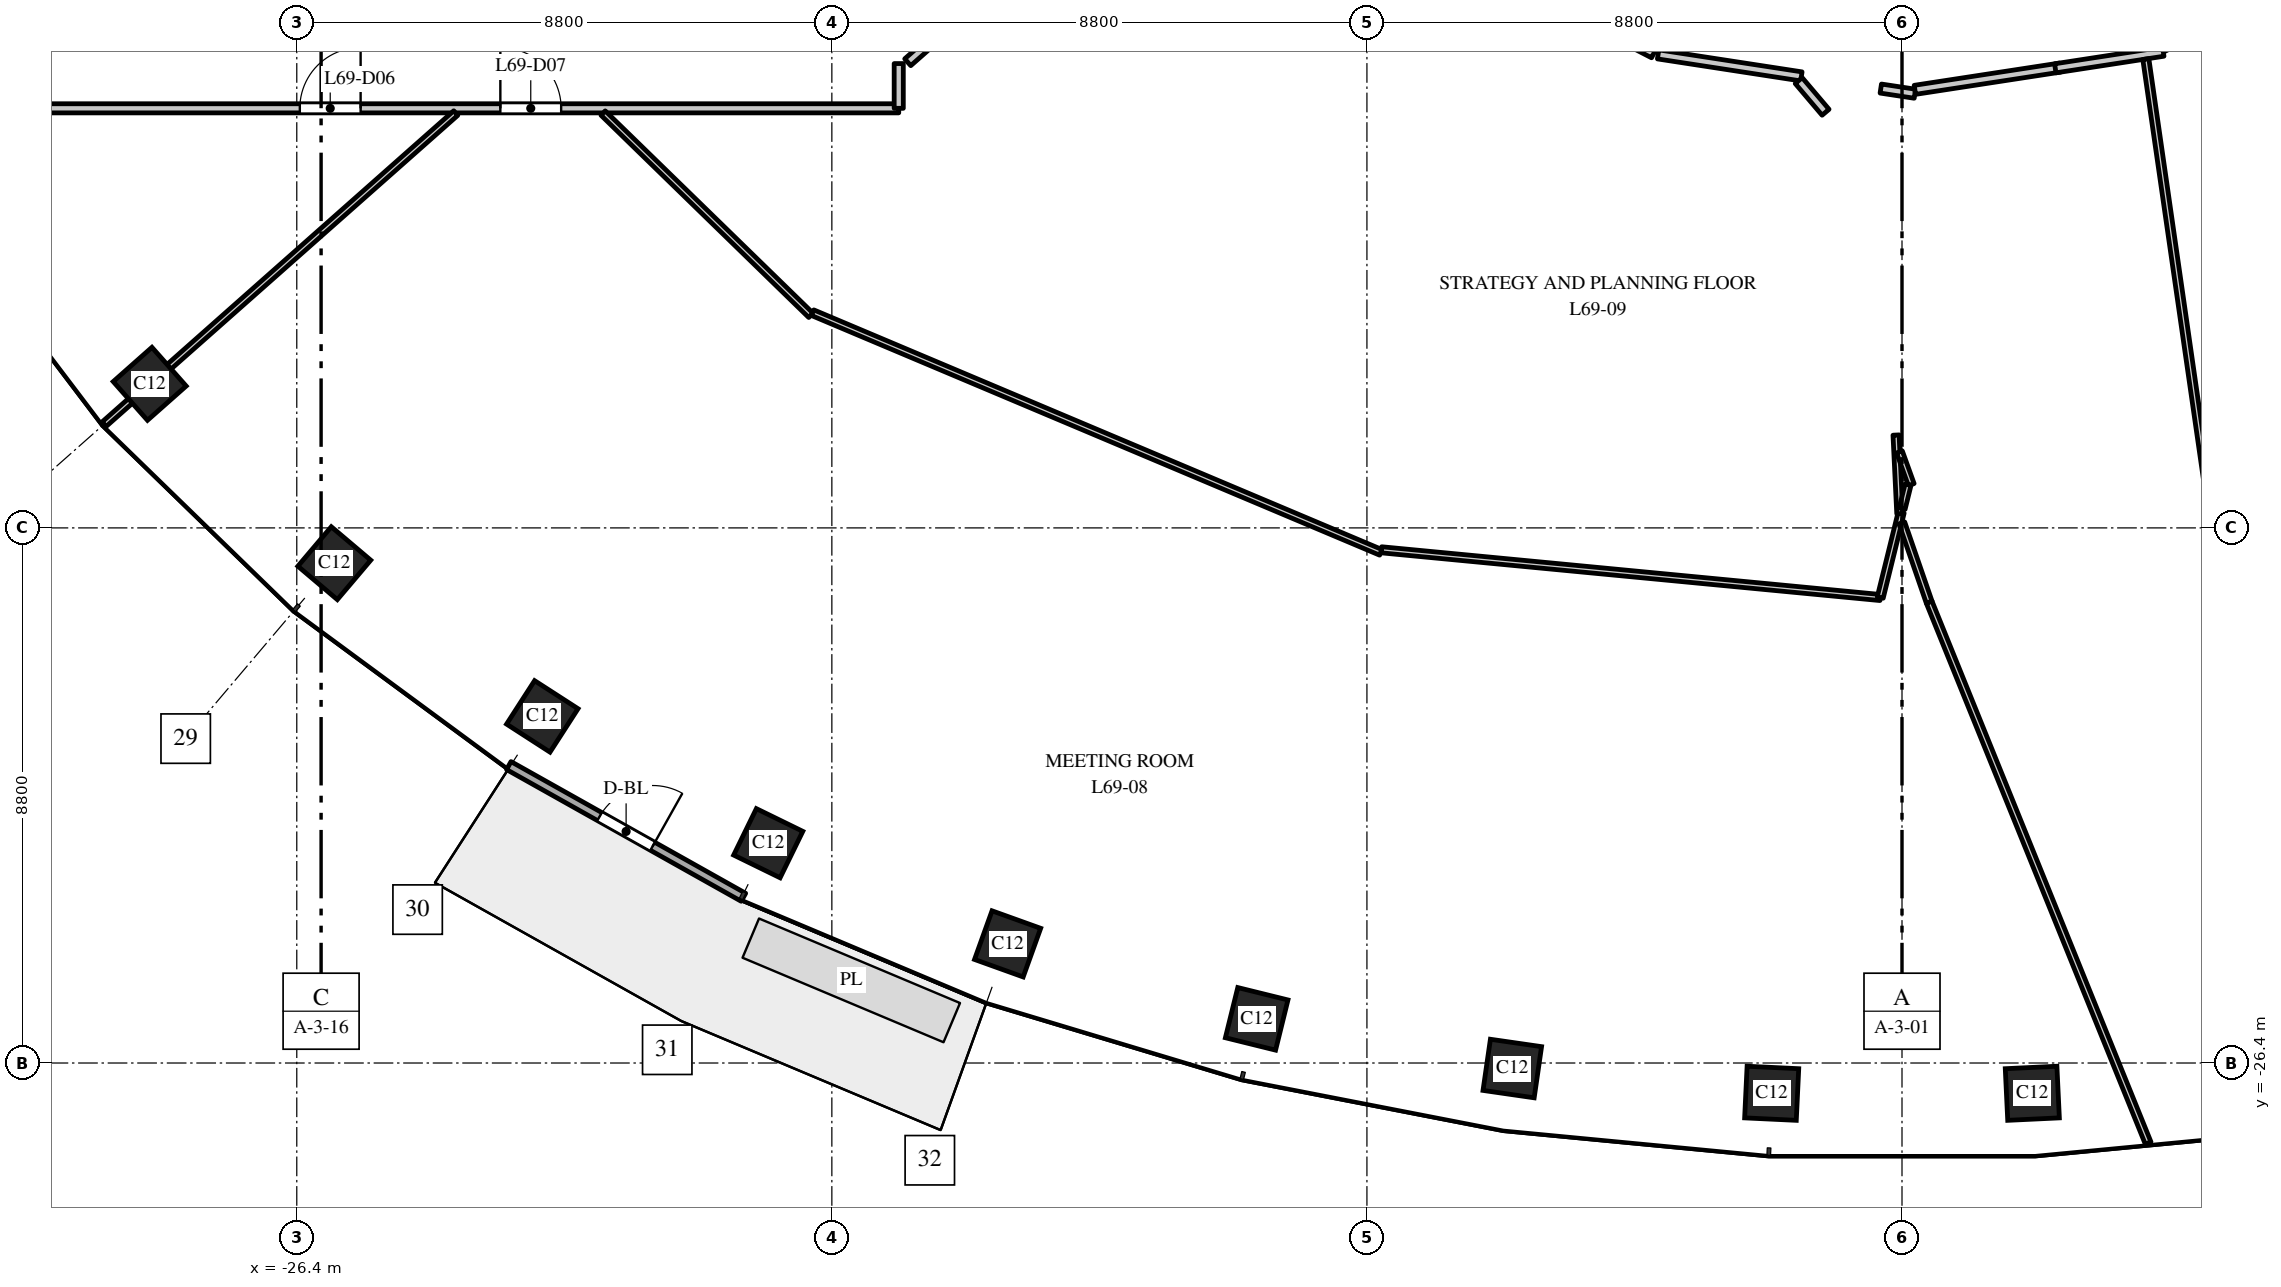
"""IFC4 building model, lengths in metres.
Left out: names, types, materials, properties, quantities, classifications, styles, units other than length and angle.
Written with IfcOpenShell. Run it as: python <this file> out.ifc"""

import sys

from ifc_helpers import new_model, si_unit, direction, frame, frame_2d, origin, origin_2d, place, context, subcontext, project, spatial, rectangle, extrude, element, fill, save


model = new_model("IFC4")
c1 = context("Model", 3, precision=1e-05, world=origin(), true_north=direction((0.0, 1.0)))
c2 = subcontext(c1, "Body", "Model", "MODEL_VIEW")
j1 = project(units=[si_unit("LENGTHUNIT", "METRE"), si_unit("PLANEANGLEUNIT", "RADIAN")], contexts=[c1])
p1 = place(None, origin())
s1 = spatial("IfcSite", under=j1, at=p1, CompositionType="ELEMENT")
p2 = place(p1, origin())
s2 = spatial("IfcBuilding", under=s1, at=p2, CompositionType="ELEMENT")
p3 = place(p2, frame((0.0, 0.0, 319.0)))
s3 = spatial("IfcBuildingStorey", under=s2, at=p3, CompositionType="ELEMENT", Elevation=319.0)
for number, where, z_axis, x_axis in (
    (1, (-28.819, -15.23, 0.0), (0.0, 0.0, 1.0), (0.663, -0.749, 0.0)),
    (2, (-25.783, -18.18, 0.0), (0.0, 0.0, 1.0), (0.763, -0.646, 0.0)),
    (3, (-22.362, -20.7, 0.0), (0.0, 0.0, 1.0), (0.84, -0.542, 0.0)),
    (4, (-18.646, -22.785, 0.0), (0.0, 0.0, 1.0), (0.898, -0.439, 0.0)),
    (5, (-14.709, -24.441, 0.0), (0.0, 0.0, 1.0), (0.941, -0.338, 0.0)),
    (6, (-10.613, -25.674, 0.0), (0.0, 0.0, 1.0), (0.971, -0.24, 0.0)),
    (7, (-6.409, -26.491, 0.0), (0.0, 0.0, 1.0), (0.99, -0.143, 0.0)),
    (8, (-2.143, -26.898, 0.0), (0.0, 0.0, 1.0), (0.999, -0.048, 0.0)),
    (9, (2.143, -26.898, 0.0), (0.0, 0.0, 1.0), (0.999, 0.048, 0.0)),
):
    element("IfcColumn", number, at=place(p3, frame(where, z_axis=z_axis, x_axis=x_axis)), inside=s3, PredefinedType="COLUMN", context=c2, shape_type="SweptSolid", body=[
        extrude(rectangle(XDim=0.85, YDim=0.85, at=origin_2d()), origin(), (0.0, 0.0, 1.0), 4.0),
    ])
p4 = place(p3, frame((-22.913, -21.509, 0.0), z_axis=(0.0, 0.0, 1.0), x_axis=(0.872046572975, -0.489422899509, 0.0)))
e10 = element("IfcWall", 10, at=p4, inside=s3, PredefinedType="STANDARD", context=c2, shape_type="SweptSolid", body=[
    extrude(rectangle(XDim=4.426, YDim=0.15, at=frame_2d((2.213, 0.0))), origin(), (0.0, 0.0, 1.0), 3.7),
])
p5 = place(p4, frame((1.713, 0.0, 0.0)))
e11 = element("IfcOpeningElement", 11, at=p5, cuts=e10, PredefinedType="OPENING", context=c2, shape_type="SweptSolid", body=[
    extrude(rectangle(XDim=1.0, YDim=2.4, at=frame_2d((0.5, 1.2))), frame((0.0, 0.085, 0.0), z_axis=(0.0, -1.0, 0.0), x_axis=(1.0, 0.0, 0.0)), (0.0, 0.0, 1.0), 0.17),
])
p6 = place(p3, frame((-31.5, -10.7, 0.0), z_axis=(0.0, 0.0, 1.0), x_axis=(1.0, 0.0, 0.0)))
e12 = element("IfcWall", 12, at=p6, inside=s3, PredefinedType="PARTITIONING", context=c2, shape_type="SweptSolid", body=[
    extrude(rectangle(XDim=15.0, YDim=0.15, at=frame_2d((7.5, 0.0))), origin(), (0.0, 0.0, 1.0), 3.1),
])
p7 = place(p6, frame((5.15, 0.0, 0.0)))
e13 = element("IfcOpeningElement", 13, at=p7, cuts=e12, PredefinedType="OPENING", context=c2, shape_type="SweptSolid", body=[
    extrude(rectangle(XDim=1.0, YDim=2.1, at=frame_2d((0.5, 1.05))), frame((0.0, 0.085, 0.0), z_axis=(0.0, -1.0, 0.0), x_axis=(1.0, 0.0, 0.0)), (0.0, 0.0, 1.0), 0.17),
])
p8 = place(p6, frame((8.448, 0.0, 0.0)))
e14 = element("IfcOpeningElement", 14, at=p8, cuts=e12, PredefinedType="OPENING", context=c2, shape_type="SweptSolid", body=[
    extrude(rectangle(XDim=1.0, YDim=2.1, at=frame_2d((0.5, 1.05))), frame((0.0, 0.085, 0.0), z_axis=(0.0, -1.0, 0.0), x_axis=(1.0, 0.0, 0.0)), (0.0, 0.0, 1.0), 0.17),
])
p9 = place(p3, frame((-29.569, -15.895, 0.0), z_axis=(0.0, 0.0, 1.0), x_axis=(0.748985701008, 0.662586160198, 0.0)))
e15 = element("IfcWall", 15, at=p9, inside=s3, PredefinedType="PARTITIONING", context=c2, shape_type="SweptSolid", body=[
    extrude(rectangle(XDim=7.723, YDim=0.1, at=frame_2d((3.861, 0.0))), origin(), (0.0, 0.0, 1.0), 3.0),
])
p10 = place(p3, frame((-21.362, -10.778, 0.0), z_axis=(0.0, 0.0, 1.0), x_axis=(0.716591049994, -0.697493560593, 0.0)))
e16 = element("IfcWall", 16, at=p10, inside=s3, PredefinedType="PARTITIONING", context=c2, shape_type="SweptSolid", body=[
    extrude(rectangle(XDim=4.768, YDim=0.1, at=frame_2d((2.384, 0.0))), origin(), (0.0, 0.0, 1.0), 2.75),
])
p11 = place(p3, frame((-17.916, -14.061, 0.0), z_axis=(0.0, 0.0, 1.0), x_axis=(0.92140228151, -0.388610133204, 0.0)))
e17 = element("IfcWall", 17, at=p11, inside=s3, PredefinedType="PARTITIONING", context=c2, shape_type="SweptSolid", body=[
    extrude(rectangle(XDim=10.141, YDim=0.1, at=frame_2d((5.071, 0.0))), origin(), (0.0, 0.0, 1.0), 2.75),
])
p12 = place(p3, frame((-16.5, -10.7, 0.0), z_axis=(0.0, 0.0, 1.0), x_axis=(0.0, 1.0, 0.0)))
e18 = element("IfcWall", 18, at=p12, inside=s3, PredefinedType="PARTITIONING", context=c2, shape_type="SweptSolid", body=[
    extrude(rectangle(XDim=0.736, YDim=0.15, at=frame_2d((0.368, 0.0))), origin(), (0.0, 0.0, 1.0), 3.7),
])
p13 = place(p3, frame((-8.562, -17.96, 0.0), z_axis=(0.0, 0.0, 1.0), x_axis=(0.995451698016, -0.095267606857, 0.0)))
e19 = element("IfcWall", 19, at=p13, inside=s3, PredefinedType="PARTITIONING", context=c2, shape_type="SweptSolid", body=[
    extrude(rectangle(XDim=8.242, YDim=0.1, at=frame_2d((4.121, 0.0))), origin(), (0.0, 0.0, 1.0), 2.85),
])
p14 = place(p3, frame((-7.39, -8.103, 0.0), z_axis=(0.0, 0.0, 1.0), x_axis=(0.889364897782, -0.457198073699, 0.0)))
e20 = element("IfcWall", 20, at=p14, inside=s3, PredefinedType="PARTITIONING", context=c2, shape_type="SweptSolid", body=[
    extrude(rectangle(XDim=3.716, YDim=0.15, at=frame_2d((1.858, 0.0))), origin(), (0.0, 0.0, 1.0), 2.75),
])
p15 = place(p3, frame((-4.011, -9.813, 0.0), z_axis=(0.0, 0.0, 1.0), x_axis=(0.988396550502, -0.151895552787, 0.0)))
e21 = element("IfcWall", 21, at=p15, inside=s3, PredefinedType="PARTITIONING", context=c2, shape_type="SweptSolid", body=[
    extrude(rectangle(XDim=2.384, YDim=0.15, at=frame_2d((1.192, 0.0))), origin(), (0.0, 0.0, 1.0), 2.85),
])
p16 = place(p3, frame((-1.699, -10.244, 0.0), z_axis=(0.0, 0.0, 1.0), x_axis=(0.646838916267, -0.762626655974, 0.0)))
e22 = element("IfcWall", 22, at=p16, inside=s3, PredefinedType="PARTITIONING", context=c2, shape_type="SweptSolid", body=[
    extrude(rectangle(XDim=0.683, YDim=0.15, at=frame_2d((0.342, 0.0))), origin(), (0.0, 0.0, 1.0), 3.7),
])
p17 = place(p3, frame((-0.358, -18.745, 0.0), z_axis=(0.0, 0.0, 1.0), x_axis=(0.239227791755, 0.970963471842, 0.0)))
e23 = element("IfcWall", 23, at=p17, inside=s3, PredefinedType="PARTITIONING", context=c2, shape_type="SweptSolid", body=[
    extrude(rectangle(XDim=1.442, YDim=0.1, at=frame_2d((0.721, 0.0))), origin(), (0.0, 0.0, 1.0), 3.7),
])
p18 = place(p3, frame((-0.349, -10.375, 0.0), z_axis=(0.0, 0.0, 1.0), x_axis=(0.98872708804, -0.149728906283, 0.0)))
e24 = element("IfcWall", 24, at=p18, inside=s3, PredefinedType="PARTITIONING", context=c2, shape_type="SweptSolid", body=[
    extrude(rectangle(XDim=0.567, YDim=0.15, at=frame_2d((0.284, 0.0))), origin(), (0.0, 0.0, 1.0), 3.7),
])
p19 = place(p3, frame((-0.098, -16.073, 0.0), z_axis=(0.0, 0.0, 1.0), x_axis=(0.047905659678, -0.998851864778, 0.0)))
e25 = element("IfcWall", 25, at=p19, inside=s3, PredefinedType="PARTITIONING", context=c2, shape_type="SweptSolid", body=[
    extrude(rectangle(XDim=1.294, YDim=0.1, at=frame_2d((0.647, 0.0))), origin(), (0.0, 0.0, 1.0), 3.7),
])
p20 = place(p3, frame((-0.042, -16.35, 0.0), z_axis=(0.0, 0.0, 1.0), x_axis=(0.339445104011, -0.940625866837, 0.0)))
e26 = element("IfcWall", 26, at=p20, inside=s3, PredefinedType="PARTITIONING", context=c2, shape_type="SweptSolid", body=[
    extrude(rectangle(XDim=0.572, YDim=0.1, at=frame_2d((0.286, 0.0))), origin(), (0.0, 0.0, 1.0), 3.7),
])
p21 = place(p3, frame((-0.003, -17.518, 0.0), z_axis=(0.0, 0.0, 1.0), x_axis=(0.326192493346, -0.945303367858, 0.0)))
e27 = element("IfcWall", 27, at=p21, inside=s3, PredefinedType="PARTITIONING", context=c2, shape_type="SweptSolid", body=[
    extrude(rectangle(XDim=1.379, YDim=0.1, at=frame_2d((0.69, 0.0))), origin(), (0.0, 0.0, 1.0), 3.7),
])
p22 = place(p3, frame((0.002, -17.284, 0.0), z_axis=(0.0, 0.0, 1.0), x_axis=(0.240121592304, 0.970742819139, 0.0)))
e28 = element("IfcWall", 28, at=p22, inside=s3, PredefinedType="PARTITIONING", context=c2, shape_type="SweptSolid", body=[
    extrude(rectangle(XDim=0.405, YDim=0.1, at=frame_2d((0.202, 0.0))), origin(), (0.0, 0.0, 1.0), 3.7),
])
p23 = place(p3, frame((0.212, -10.396, 0.0), z_axis=(0.0, 0.0, 1.0), x_axis=(0.988452196461, 0.151533017232, 0.0)))
e29 = element("IfcWall", 29, at=p23, inside=s3, PredefinedType="PARTITIONING", context=c2, shape_type="SweptSolid", body=[
    extrude(rectangle(XDim=2.415, YDim=0.15, at=frame_2d((1.208, 0.0))), origin(), (0.0, 0.0, 1.0), 2.85),
])
p24 = place(p3, frame((0.447, -18.822, 0.0), z_axis=(0.0, 0.0, 1.0), x_axis=(0.375291654354, -0.926906777498, 0.0)))
e30 = element("IfcWall", 30, at=p24, inside=s3, PredefinedType="PARTITIONING", context=c2, shape_type="SweptSolid", body=[
    extrude(rectangle(XDim=9.595, YDim=0.1, at=frame_2d((4.798, 0.0))), origin(), (0.0, 0.0, 1.0), 3.0),
])
p25 = place(p3, frame((2.521, -10.042, 0.0), z_axis=(0.0, 0.0, 1.0), x_axis=(0.988396814715, 0.151893833519, 0.0)))
e31 = element("IfcWall", 31, at=p25, inside=s3, PredefinedType="PARTITIONING", context=c2, shape_type="SweptSolid", body=[
    extrude(rectangle(XDim=1.797, YDim=0.15, at=frame_2d((0.898, 0.0))), origin(), (0.0, 0.0, 1.0), 3.7),
])
p26 = place(p3, frame((4.01, -9.89, 0.0), z_axis=(0.0, 0.0, 1.0), x_axis=(0.142916336901, -0.98973477288, 0.0)))
e32 = element("IfcWall", 32, at=p26, inside=s3, PredefinedType="PARTITIONING", context=c2, shape_type="SweptSolid", body=[
    extrude(rectangle(XDim=8.733, YDim=0.1, at=frame_2d((4.366, 0.0))), origin(), (0.0, 0.0, 1.0), 3.7),
])
p27 = place(p3, frame((-15.09, -8.831, 0.0), z_axis=(0.0, 0.0, 1.0), x_axis=(-0.750621325629, -0.660732642989, 0.0)))
e33 = element("IfcWall", 33, at=p27, inside=s3, PredefinedType="PARTITIONING", context=c2, shape_type="SweptSolid", body=[
    extrude(rectangle(XDim=1.681, YDim=0.15, at=frame_2d((0.841, 0.0))), origin(), (0.0, 0.0, 1.0), 3.7),
])
p28 = place(p5, origin())
e34 = element("IfcDoor", 34, at=p28, inside=s3, OperationType="SINGLE_SWING_RIGHT", PredefinedType="DOOR", context=c2, shape_type="SweptSolid", body=[
    extrude(rectangle(XDim=1.0, YDim=2.4, at=frame_2d((0.5, 1.2))), frame((0.0, 0.025, 0.0), z_axis=(0.0, -1.0, 0.0), x_axis=(1.0, 0.0, 0.0)), (0.0, 0.0, 1.0), 0.05),
])
fill(e11, e34)
p29 = place(p7, origin())
e35 = element("IfcDoor", 35, at=p29, inside=s3, OperationType="SINGLE_SWING_RIGHT", PredefinedType="DOOR", context=c2, shape_type="SweptSolid", body=[
    extrude(rectangle(XDim=1.0, YDim=2.1, at=frame_2d((0.5, 1.05))), frame((0.0, 0.025, 0.0), z_axis=(0.0, -1.0, 0.0), x_axis=(1.0, 0.0, 0.0)), (0.0, 0.0, 1.0), 0.05),
])
fill(e13, e35)
p30 = place(p8, origin())
e36 = element("IfcDoor", 36, at=p30, inside=s3, OperationType="SINGLE_SWING_LEFT", PredefinedType="DOOR", context=c2, shape_type="SweptSolid", body=[
    extrude(rectangle(XDim=1.0, YDim=2.1, at=frame_2d((0.5, 1.05))), frame((0.0, 0.025, 0.0), z_axis=(0.0, -1.0, 0.0), x_axis=(1.0, 0.0, 0.0)), (0.0, 0.0, 1.0), 0.05),
])
fill(e14, e36)
save(model, sys.argv[1])
